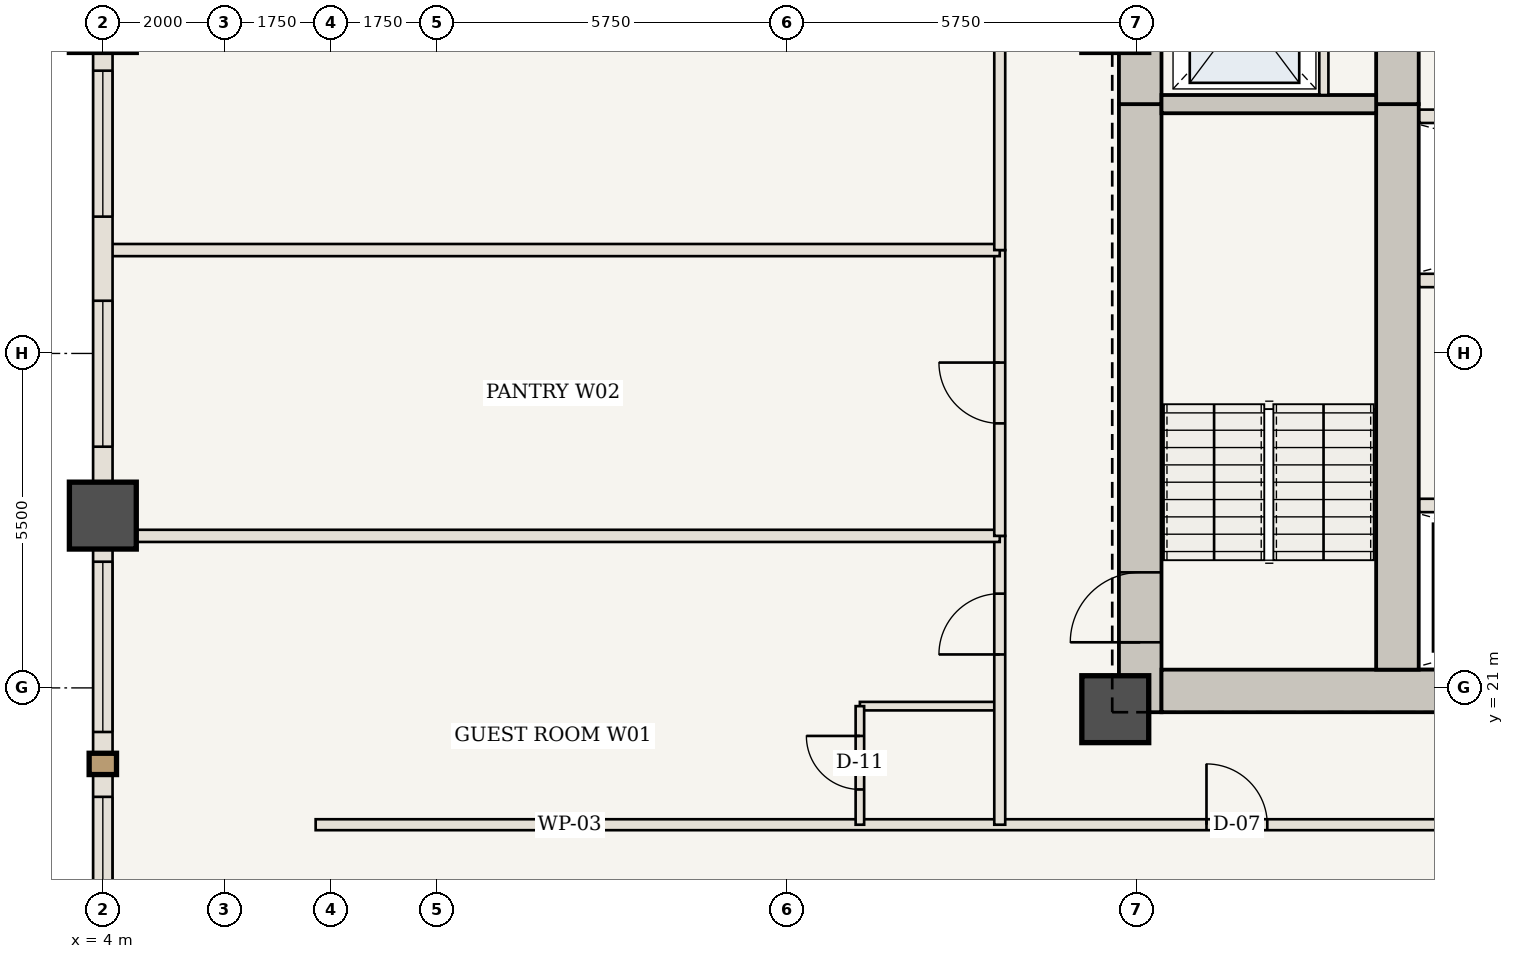
"""IFC4 building model, lengths in metres.
Left out: names, types, materials, properties, quantities, classifications, styles, units other than length and angle.
Written with IfcOpenShell. Run it as: python <this file> out.ifc"""

import sys

from ifc_helpers import new_model, si_unit, direction, frame, frame_2d, origin, origin_2d, place, context, subcontext, project, spatial, rectangle, extrude, element, fill, save


model = new_model("IFC4")
c1 = context("Model", 3, precision=1e-05, world=origin(), true_north=direction((0.0, 1.0)))
c2 = subcontext(c1, "Body", "Model", "MODEL_VIEW")
j1 = project(units=[si_unit("LENGTHUNIT", "METRE"), si_unit("PLANEANGLEUNIT", "RADIAN")], contexts=[c1])
p1 = place(None, origin())
s1 = spatial("IfcSite", under=j1, at=p1, CompositionType="ELEMENT")
p2 = place(p1, origin())
s2 = spatial("IfcBuilding", under=s1, at=p2, CompositionType="ELEMENT")
p3 = place(p2, frame((0.0, 0.0, 82.25)))
s3 = spatial("IfcBuildingStorey", under=s2, at=p3, CompositionType="ELEMENT", Elevation=82.25)
p4 = place(p3, frame((21.06, 20.6, 0.0), z_axis=(0.0, 0.0, 1.0), x_axis=(0.0, 1.0, 0.0)))
e1 = element("IfcWall", 1, at=p4, inside=s3, PredefinedType="SHEAR", context=c2, shape_type="SweptSolid", body=[
    extrude(rectangle(XDim=10.0, YDim=0.7, at=frame_2d((5.0, 0.0))), origin(), (0.0, 0.0, 1.0), 3.5),
])
p5 = place(p4, frame((1.15, 0.0, 0.0)))
e2 = element("IfcOpeningElement", 2, at=p5, cuts=e1, PredefinedType="OPENING", context=c2, shape_type="SweptSolid", body=[
    extrude(rectangle(XDim=1.15, YDim=2.15, at=frame_2d((0.575, 1.075))), frame((0.0, 0.36, 0.0), z_axis=(0.0, -1.0, 0.0), x_axis=(1.0, 0.0, 0.0)), (0.0, 0.0, 1.0), 0.72),
])
p6 = place(p3, frame((21.06, 30.6, 0.0), z_axis=(0.0, 0.0, 1.0), x_axis=(0.0, 1.0, 0.0)))
e3 = element("IfcWall", 3, at=p6, inside=s3, PredefinedType="SHEAR", context=c2, shape_type="SweptSolid", body=[
    extrude(rectangle(XDim=12.75, YDim=0.7, at=frame_2d((6.375, 0.0))), origin(), (0.0, 0.0, 1.0), 3.5),
])
p7 = place(p6, frame((4.2, 0.0, 0.0)))
e4 = element("IfcOpeningElement", 4, at=p7, cuts=e3, PredefinedType="OPENING", context=c2, shape_type="SweptSolid", body=[
    extrude(rectangle(XDim=1.1, YDim=2.15, at=frame_2d((0.55, 1.075))), frame((0.0, 0.36, 0.0), z_axis=(0.0, -1.0, 0.0), x_axis=(1.0, 0.0, 0.0)), (0.0, 0.0, 1.0), 0.72),
])
p8 = place(p6, frame((9.2, 0.0, 0.0)))
e5 = element("IfcOpeningElement", 5, at=p8, cuts=e3, PredefinedType="OPENING", context=c2, shape_type="SweptSolid", body=[
    extrude(rectangle(XDim=0.92, YDim=2.1, at=frame_2d((0.46, 1.05))), frame((0.0, 0.36, 0.0), z_axis=(0.0, -1.0, 0.0), x_axis=(1.0, 0.0, 0.0)), (0.0, 0.0, 1.0), 0.72),
])
p9 = place(p3, frame((21.41, 20.95, 0.0), z_axis=(0.0, 0.0, 1.0), x_axis=(1.0, 0.0, 0.0)))
e6 = element("IfcWall", 6, at=p9, inside=s3, PredefinedType="SHEAR", context=c2, shape_type="SweptSolid", body=[
    extrude(rectangle(XDim=13.74, YDim=0.7, at=frame_2d((6.87, 0.0))), origin(), (0.0, 0.0, 1.0), 3.5),
])
p10 = place(p3, frame((25.29, 21.3, 0.0), z_axis=(0.0, 0.0, 1.0), x_axis=(0.0, 1.0, 0.0)))
e7 = element("IfcWall", 7, at=p10, inside=s3, PredefinedType="SHEAR", context=c2, shape_type="SweptSolid", body=[
    extrude(rectangle(XDim=9.3, YDim=0.7, at=frame_2d((4.65, 0.0))), origin(), (0.0, 0.0, 1.0), 3.5),
])
p11 = place(p3, frame((25.29, 30.6, 0.0), z_axis=(0.0, 0.0, 1.0), x_axis=(0.0, 1.0, 0.0)))
e8 = element("IfcWall", 8, at=p11, inside=s3, PredefinedType="SHEAR", context=c2, shape_type="SweptSolid", body=[
    extrude(rectangle(XDim=12.05, YDim=0.7, at=frame_2d((6.025, 0.0))), origin(), (0.0, 0.0, 1.0), 3.5),
])
p12 = place(p11, frame((6.25, 0.0, 0.0)))
e9 = element("IfcOpeningElement", 9, at=p12, cuts=e8, PredefinedType="OPENING", context=c2, shape_type="SweptSolid", body=[
    extrude(rectangle(XDim=1.1, YDim=2.15, at=frame_2d((0.55, 1.075))), frame((0.0, 0.36, 0.0), z_axis=(0.0, -1.0, 0.0), x_axis=(1.0, 0.0, 0.0)), (0.0, 0.0, 1.0), 0.72),
])
for number, where, z_axis, x_axis in (
    (10, (20.65, 20.65, 0.0), (0.0, 0.0, 1.0), (1.0, 0.0, 0.0)),
    (11, (4.0, 23.833, 0.0), (0.0, 0.0, 1.0), (1.0, 0.0, 0.0)),
):
    element("IfcColumn", number, at=place(p3, frame(where, z_axis=z_axis, x_axis=x_axis)), inside=s3, PredefinedType="COLUMN", context=c2, shape_type="SweptSolid", body=[
        extrude(rectangle(XDim=1.1, YDim=1.1, at=origin_2d()), origin(), (0.0, 0.0, 1.0), 3.5),
    ])
p13 = place(p3, frame((21.41, 30.6, 0.0), z_axis=(0.0, 0.0, 1.0), x_axis=(1.0, 0.0, 0.0)))
e12 = element("IfcWall", 12, at=p13, inside=s3, PredefinedType="SHEAR", context=c2, shape_type="SweptSolid", body=[
    extrude(rectangle(XDim=3.53, YDim=0.3, at=frame_2d((1.765, 0.0))), origin(), (0.0, 0.0, 1.0), 3.32),
])
p14 = place(p3, frame((24.08, 30.75, 0.0), z_axis=(0.0, 0.0, 1.0), x_axis=(0.0, 1.0, 0.0)))
e13 = element("IfcWall", 13, at=p14, inside=s3, PredefinedType="STANDARD", context=c2, shape_type="SweptSolid", body=[
    extrude(rectangle(XDim=2.65, YDim=0.15, at=frame_2d((1.325, 0.0))), origin(), (0.0, 0.0, 1.0), 3.32),
])
p15 = place(p3, frame((25.65, 24.0, 0.0), z_axis=(0.0, 0.0, 1.0), x_axis=(1.0, 0.0, 0.0)))
e14 = element("IfcWall", 14, at=p15, inside=s3, PredefinedType="STANDARD", context=c2, shape_type="SweptSolid", body=[
    extrude(rectangle(XDim=9.25, YDim=0.22, at=frame_2d((4.625, 0.0))), origin(), (0.0, 0.0, 1.0), 3.32),
])
p16 = place(p15, frame((0.58, 0.0, 0.0)))
e15 = element("IfcOpeningElement", 15, at=p16, cuts=e14, PredefinedType="OPENING", context=c2, shape_type="SweptSolid", body=[
    extrude(rectangle(XDim=1.1, YDim=2.15, at=frame_2d((0.55, 1.075))), frame((0.0, 0.12, 0.0), z_axis=(0.0, -1.0, 0.0), x_axis=(1.0, 0.0, 0.0)), (0.0, 0.0, 1.0), 0.24),
])
p17 = place(p15, frame((2.75, 0.0, 0.0)))
e16 = element("IfcOpeningElement", 16, at=p17, cuts=e14, PredefinedType="OPENING", context=c2, shape_type="SweptSolid", body=[
    extrude(rectangle(XDim=1.1, YDim=2.15, at=frame_2d((0.55, 1.075))), frame((0.0, 0.12, 0.0), z_axis=(0.0, -1.0, 0.0), x_axis=(1.0, 0.0, 0.0)), (0.0, 0.0, 1.0), 0.24),
])
p18 = place(p15, frame((5.05, 0.0, 0.0)))
e17 = element("IfcOpeningElement", 17, at=p18, cuts=e14, PredefinedType="OPENING", context=c2, shape_type="SweptSolid", body=[
    extrude(rectangle(XDim=1.1, YDim=2.15, at=frame_2d((0.55, 1.075))), frame((0.0, 0.12, 0.0), z_axis=(0.0, -1.0, 0.0), x_axis=(1.0, 0.0, 0.0)), (0.0, 0.0, 1.0), 0.24),
])
p19 = place(p15, frame((7.35, 0.0, 0.0)))
e18 = element("IfcOpeningElement", 18, at=p19, cuts=e14, PredefinedType="OPENING", context=c2, shape_type="SweptSolid", body=[
    extrude(rectangle(XDim=1.1, YDim=2.15, at=frame_2d((0.55, 1.075))), frame((0.0, 0.12, 0.0), z_axis=(0.0, -1.0, 0.0), x_axis=(1.0, 0.0, 0.0)), (0.0, 0.0, 1.0), 0.24),
])
for number, where, z_axis, x_axis in (
    (19, (25.65, 27.7, 0.0), (0.0, 0.0, 1.0), (1.0, 0.0, 0.0)),
    (20, (25.65, 30.4, 0.0), (0.0, 0.0, 1.0), (1.0, 0.0, 0.0)),
):
    element("IfcWall", number, at=place(p3, frame(where, z_axis=z_axis, x_axis=x_axis)), inside=s3, PredefinedType="STANDARD", context=c2, shape_type="SweptSolid", body=[
        extrude(rectangle(XDim=9.25, YDim=0.22, at=frame_2d((4.625, 0.0))), origin(), (0.0, 0.0, 1.0), 3.32),
    ])
p20 = place(p3, frame((7.5, 18.75, 0.0), z_axis=(0.0, 0.0, 1.0), x_axis=(1.0, 0.0, 0.0)))
e21 = element("IfcWall", 21, at=p20, inside=s3, PredefinedType="STANDARD", context=c2, shape_type="SweptSolid", body=[
    extrude(rectangle(XDim=19.0, YDim=0.18, at=frame_2d((9.5, 0.0))), origin(), (0.0, 0.0, 1.0), 3.32),
])
p21 = place(p20, frame((14.65, 0.0, 0.0)))
e22 = element("IfcOpeningElement", 22, at=p21, cuts=e21, PredefinedType="OPENING", context=c2, shape_type="SweptSolid", body=[
    extrude(rectangle(XDim=1.0, YDim=2.15, at=frame_2d((0.5, 1.075))), frame((0.0, 0.1, 0.0), z_axis=(0.0, -1.0, 0.0), x_axis=(1.0, 0.0, 0.0)), (0.0, 0.0, 1.0), 0.2),
])
p22 = place(p3, frame((16.45, 20.7, 0.0), z_axis=(0.0, 0.0, 1.0), x_axis=(1.0, 0.0, 0.0)))
e23 = element("IfcWall", 23, at=p22, inside=s3, PredefinedType="STANDARD", context=c2, shape_type="SweptSolid", body=[
    extrude(rectangle(XDim=2.3, YDim=0.14, at=frame_2d((1.15, 0.0))), origin(), (0.0, 0.0, 1.0), 2.615),
])
p23 = place(p3, frame((16.45, 18.75, 0.0), z_axis=(0.0, 0.0, 1.0), x_axis=(0.0, 1.0, 0.0)))
e24 = element("IfcWall", 24, at=p23, inside=s3, PredefinedType="STANDARD", context=c2, shape_type="SweptSolid", body=[
    extrude(rectangle(XDim=1.95, YDim=0.14, at=frame_2d((0.975, 0.0))), origin(), (0.0, 0.0, 1.0), 3.32),
])
p24 = place(p23, frame((0.58, 0.0, 0.0)))
e25 = element("IfcOpeningElement", 25, at=p24, cuts=e24, PredefinedType="OPENING", context=c2, shape_type="SweptSolid", body=[
    extrude(rectangle(XDim=0.88, YDim=2.1, at=frame_2d((0.44, 1.05))), frame((0.0, 0.08, 0.0), z_axis=(0.0, -1.0, 0.0), x_axis=(1.0, 0.0, 0.0)), (0.0, 0.0, 1.0), 0.16),
])
p25 = place(p3, frame((18.75, 18.75, 0.0), z_axis=(0.0, 0.0, 1.0), x_axis=(0.0, 1.0, 0.0)))
e26 = element("IfcWall", 26, at=p25, inside=s3, PredefinedType="STANDARD", context=c2, shape_type="SweptSolid", body=[
    extrude(rectangle(XDim=4.75, YDim=0.18, at=frame_2d((2.375, 0.0))), origin(), (0.0, 0.0, 1.0), 3.32),
])
p26 = place(p25, frame((2.8, 0.0, 0.0)))
e27 = element("IfcOpeningElement", 27, at=p26, cuts=e26, PredefinedType="OPENING", context=c2, shape_type="SweptSolid", body=[
    extrude(rectangle(XDim=1.0, YDim=2.15, at=frame_2d((0.5, 1.075))), frame((0.0, 0.1, 0.0), z_axis=(0.0, -1.0, 0.0), x_axis=(1.0, 0.0, 0.0)), (0.0, 0.0, 1.0), 0.2),
])
p27 = place(p3, frame((4.06, 23.5, 0.0), z_axis=(0.0, 0.0, 1.0), x_axis=(1.0, 0.0, 0.0)))
e28 = element("IfcWall", 28, at=p27, inside=s3, PredefinedType="STANDARD", context=c2, shape_type="SweptSolid", body=[
    extrude(rectangle(XDim=14.69, YDim=0.2, at=frame_2d((7.345, 0.0))), origin(), (0.0, 0.0, 1.0), 3.32),
])
p28 = place(p3, frame((18.75, 23.5, 0.0), z_axis=(0.0, 0.0, 1.0), x_axis=(0.0, 1.0, 0.0)))
e29 = element("IfcWall", 29, at=p28, inside=s3, PredefinedType="STANDARD", context=c2, shape_type="SweptSolid", body=[
    extrude(rectangle(XDim=4.7, YDim=0.18, at=frame_2d((2.35, 0.0))), origin(), (0.0, 0.0, 1.0), 3.32),
])
p29 = place(p28, frame((1.85, 0.0, 0.0)))
e30 = element("IfcOpeningElement", 30, at=p29, cuts=e29, PredefinedType="OPENING", context=c2, shape_type="SweptSolid", body=[
    extrude(rectangle(XDim=1.0, YDim=2.15, at=frame_2d((0.5, 1.075))), frame((0.0, 0.1, 0.0), z_axis=(0.0, -1.0, 0.0), x_axis=(1.0, 0.0, 0.0)), (0.0, 0.0, 1.0), 0.2),
])
p30 = place(p3, frame((4.06, 28.2, 0.0), z_axis=(0.0, 0.0, 1.0), x_axis=(1.0, 0.0, 0.0)))
e31 = element("IfcWall", 31, at=p30, inside=s3, PredefinedType="STANDARD", context=c2, shape_type="SweptSolid", body=[
    extrude(rectangle(XDim=14.69, YDim=0.2, at=frame_2d((7.345, 0.0))), origin(), (0.0, 0.0, 1.0), 3.32),
])
p31 = place(p3, frame((18.75, 28.2, 0.0), z_axis=(0.0, 0.0, 1.0), x_axis=(0.0, 1.0, 0.0)))
e32 = element("IfcWall", 32, at=p31, inside=s3, PredefinedType="STANDARD", context=c2, shape_type="SweptSolid", body=[
    extrude(rectangle(XDim=9.6, YDim=0.18, at=frame_2d((4.8, 0.0))), origin(), (0.0, 0.0, 1.0), 3.32),
])
p32 = place(p31, frame((5.75, 0.0, 0.0)))
e33 = element("IfcOpeningElement", 33, at=p32, cuts=e32, PredefinedType="OPENING", context=c2, shape_type="SweptSolid", body=[
    extrude(rectangle(XDim=1.0, YDim=2.15, at=frame_2d((0.5, 1.075))), frame((0.0, 0.1, 0.0), z_axis=(0.0, -1.0, 0.0), x_axis=(1.0, 0.0, 0.0)), (0.0, 0.0, 1.0), 0.2),
])
p33 = place(p3, frame((4.0, 15.667, 0.0), z_axis=(0.0, 0.0, 1.0), x_axis=(0.0, 1.0, 0.0)))
e34 = element("IfcWall", 34, at=p33, inside=s3, PredefinedType="USERDEFINED", context=c2, shape_type="SweptSolid", body=[
    extrude(rectangle(XDim=8.167, YDim=0.32, at=frame_2d((4.083, 0.0))), origin(), (0.0, 0.0, 1.0), 2.52),
])
p34 = place(p33, frame((0.742, 0.0, 0.85)))
e35 = element("IfcOpeningElement", 35, at=p34, cuts=e34, PredefinedType="OPENING", context=c2, shape_type="SweptSolid", body=[
    extrude(rectangle(XDim=2.8, YDim=1.47, at=frame_2d((1.4, 0.735))), frame((0.0, 0.17, 0.0), z_axis=(0.0, -1.0, 0.0), x_axis=(1.0, 0.0, 0.0)), (0.0, 0.0, 1.0), 0.34),
])
p35 = place(p33, frame((4.608, 0.0, 0.85)))
e36 = element("IfcOpeningElement", 36, at=p35, cuts=e34, PredefinedType="OPENING", context=c2, shape_type="SweptSolid", body=[
    extrude(rectangle(XDim=2.8, YDim=1.47, at=frame_2d((1.4, 0.735))), frame((0.0, 0.17, 0.0), z_axis=(0.0, -1.0, 0.0), x_axis=(1.0, 0.0, 0.0)), (0.0, 0.0, 1.0), 0.34),
])
p36 = place(p3, frame((4.0, 23.833, 0.0), z_axis=(0.0, 0.0, 1.0), x_axis=(0.0, 1.0, 0.0)))
e37 = element("IfcWall", 37, at=p36, inside=s3, PredefinedType="USERDEFINED", context=c2, shape_type="SweptSolid", body=[
    extrude(rectangle(XDim=8.167, YDim=0.32, at=frame_2d((4.083, 0.0))), origin(), (0.0, 0.0, 1.0), 2.52),
])
p37 = place(p36, frame((1.133, 0.0, 0.85)))
e38 = element("IfcOpeningElement", 38, at=p37, cuts=e37, PredefinedType="OPENING", context=c2, shape_type="SweptSolid", body=[
    extrude(rectangle(XDim=2.4, YDim=1.47, at=frame_2d((1.2, 0.735))), frame((0.0, 0.17, 0.0), z_axis=(0.0, -1.0, 0.0), x_axis=(1.0, 0.0, 0.0)), (0.0, 0.0, 1.0), 0.34),
])
p38 = place(p36, frame((4.917, 0.0, 0.85)))
e39 = element("IfcOpeningElement", 39, at=p38, cuts=e37, PredefinedType="OPENING", context=c2, shape_type="SweptSolid", body=[
    extrude(rectangle(XDim=2.4, YDim=1.47, at=frame_2d((1.2, 0.735))), frame((0.0, 0.17, 0.0), z_axis=(0.0, -1.0, 0.0), x_axis=(1.0, 0.0, 0.0)), (0.0, 0.0, 1.0), 0.34),
])
p39 = place(p5, origin())
e40 = element("IfcDoor", 40, at=p39, inside=s3, OperationType="SINGLE_SWING_LEFT", PredefinedType="DOOR", context=c2, shape_type="SweptSolid", body=[
    extrude(rectangle(XDim=1.15, YDim=2.15, at=frame_2d((0.575, 1.075))), frame((0.0, 0.025, 0.0), z_axis=(0.0, -1.0, 0.0), x_axis=(1.0, 0.0, 0.0)), (0.0, 0.0, 1.0), 0.05),
])
fill(e2, e40)
p40 = place(p21, origin())
e41 = element("IfcDoor", 41, at=p40, inside=s3, OperationType="SINGLE_SWING_LEFT", PredefinedType="DOOR", context=c2, shape_type="SweptSolid", body=[
    extrude(rectangle(XDim=1.0, YDim=2.15, at=frame_2d((0.5, 1.075))), frame((0.0, 0.025, 0.0), z_axis=(0.0, -1.0, 0.0), x_axis=(1.0, 0.0, 0.0)), (0.0, 0.0, 1.0), 0.05),
])
fill(e22, e41)
p41 = place(p24, origin())
e42 = element("IfcDoor", 42, at=p41, inside=s3, OperationType="SINGLE_SWING_RIGHT", PredefinedType="DOOR", context=c2, shape_type="SweptSolid", body=[
    extrude(rectangle(XDim=0.88, YDim=2.1, at=frame_2d((0.44, 1.05))), frame((0.0, 0.025, 0.0), z_axis=(0.0, -1.0, 0.0), x_axis=(1.0, 0.0, 0.0)), (0.0, 0.0, 1.0), 0.05),
])
fill(e25, e42)
p42 = place(p26, origin())
e43 = element("IfcDoor", 43, at=p42, inside=s3, OperationType="SINGLE_SWING_LEFT", PredefinedType="DOOR", context=c2, shape_type="SweptSolid", body=[
    extrude(rectangle(XDim=1.0, YDim=2.15, at=frame_2d((0.5, 1.075))), frame((0.0, 0.025, 0.0), z_axis=(0.0, -1.0, 0.0), x_axis=(1.0, 0.0, 0.0)), (0.0, 0.0, 1.0), 0.05),
])
fill(e27, e43)
p43 = place(p29, origin())
e44 = element("IfcDoor", 44, at=p43, inside=s3, OperationType="SINGLE_SWING_RIGHT", PredefinedType="DOOR", context=c2, shape_type="SweptSolid", body=[
    extrude(rectangle(XDim=1.0, YDim=2.15, at=frame_2d((0.5, 1.075))), frame((0.0, 0.025, 0.0), z_axis=(0.0, -1.0, 0.0), x_axis=(1.0, 0.0, 0.0)), (0.0, 0.0, 1.0), 0.05),
])
fill(e30, e44)
p44 = place(p34, origin())
e45 = element("IfcWindow", 45, at=p44, inside=s3, PartitioningType="SINGLE_PANEL", PredefinedType="WINDOW", context=c2, shape_type="SweptSolid", body=[
    extrude(rectangle(XDim=2.8, YDim=1.47, at=frame_2d((1.4, 0.735))), frame((0.0, 0.03, 0.0), z_axis=(0.0, -1.0, 0.0), x_axis=(1.0, 0.0, 0.0)), (0.0, 0.0, 1.0), 0.06),
])
fill(e35, e45)
p45 = place(p35, origin())
e46 = element("IfcWindow", 46, at=p45, inside=s3, PartitioningType="SINGLE_PANEL", PredefinedType="WINDOW", context=c2, shape_type="SweptSolid", body=[
    extrude(rectangle(XDim=2.8, YDim=1.47, at=frame_2d((1.4, 0.735))), frame((0.0, 0.03, 0.0), z_axis=(0.0, -1.0, 0.0), x_axis=(1.0, 0.0, 0.0)), (0.0, 0.0, 1.0), 0.06),
])
fill(e36, e46)
p46 = place(p37, origin())
e47 = element("IfcWindow", 47, at=p46, inside=s3, PartitioningType="SINGLE_PANEL", PredefinedType="WINDOW", context=c2, shape_type="SweptSolid", body=[
    extrude(rectangle(XDim=2.4, YDim=1.47, at=frame_2d((1.2, 0.735))), frame((0.0, 0.03, 0.0), z_axis=(0.0, -1.0, 0.0), x_axis=(1.0, 0.0, 0.0)), (0.0, 0.0, 1.0), 0.06),
])
fill(e38, e47)
p47 = place(p38, origin())
e48 = element("IfcWindow", 48, at=p47, inside=s3, PartitioningType="SINGLE_PANEL", PredefinedType="WINDOW", context=c2, shape_type="SweptSolid", body=[
    extrude(rectangle(XDim=2.4, YDim=1.47, at=frame_2d((1.2, 0.735))), frame((0.0, 0.03, 0.0), z_axis=(0.0, -1.0, 0.0), x_axis=(1.0, 0.0, 0.0)), (0.0, 0.0, 1.0), 0.06),
])
fill(e39, e48)
save(model, sys.argv[1])
